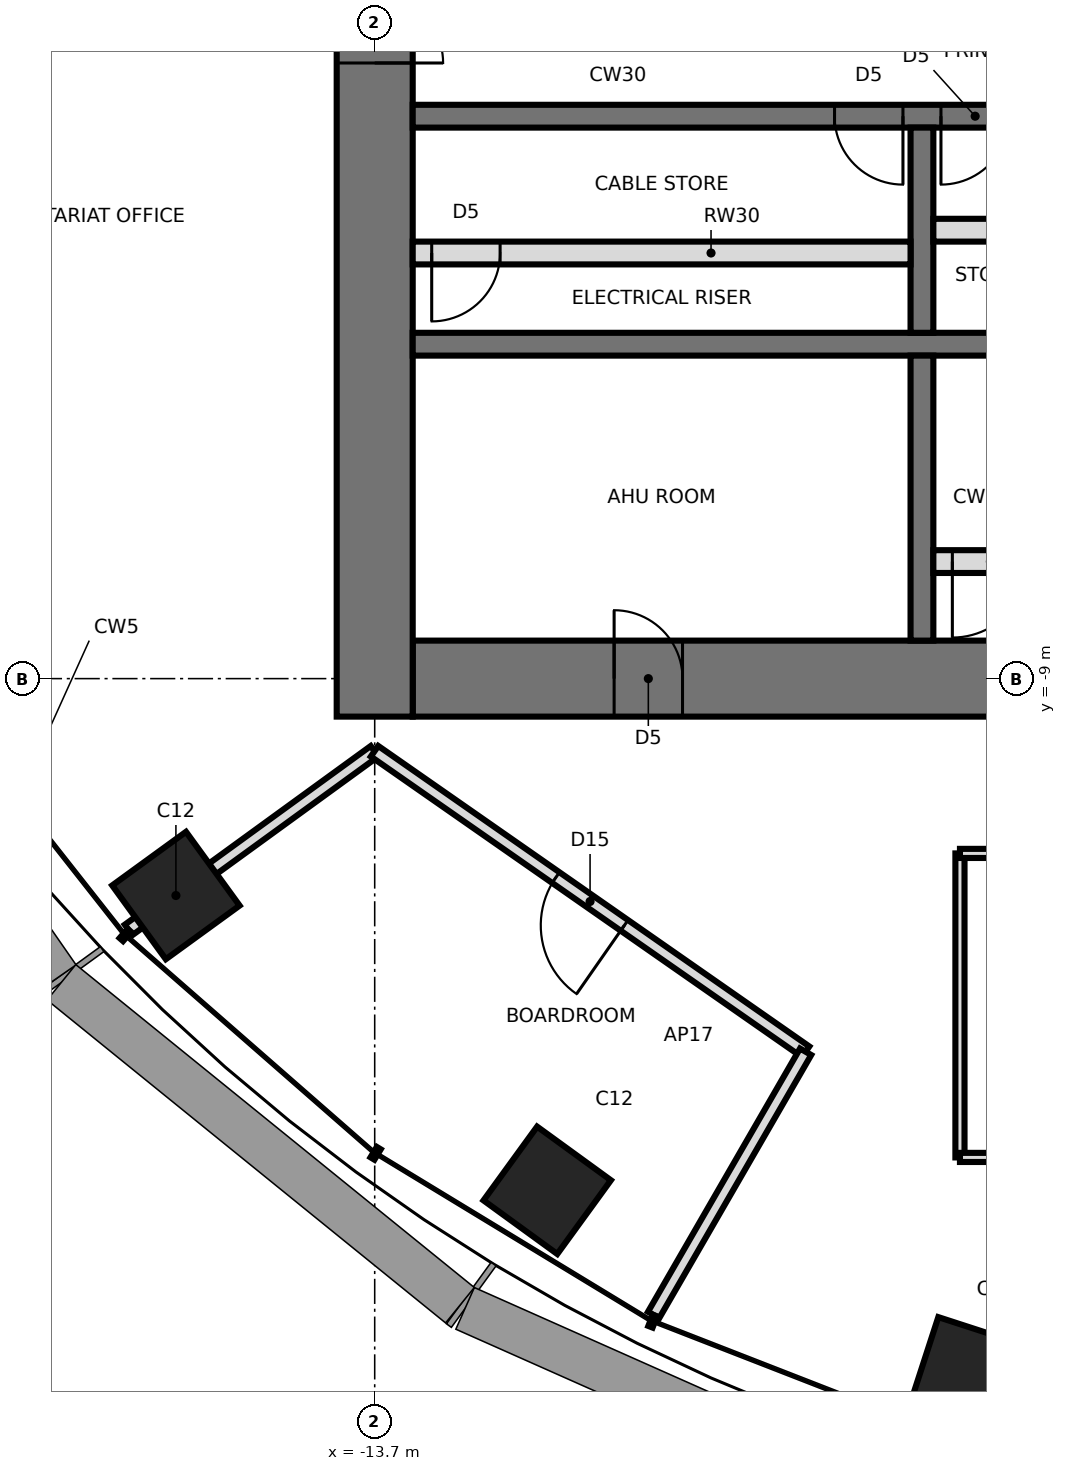
"""IFC4 building model, lengths in metres.
Left out: names, types, materials, properties, quantities, classifications, styles, units other than length and angle.
Written with IfcOpenShell. Run it as: python <this file> out.ifc"""

import sys

from ifc_helpers import new_model, si_unit, direction, frame, frame_2d, origin, origin_2d, place, context, subcontext, project, spatial, rectangle, extrude, element, fill, save


model = new_model("IFC4")
c1 = context("Model", 3, precision=1e-05, world=origin(), true_north=direction((0.0, 1.0)))
c2 = subcontext(c1, "Body", "Model", "MODEL_VIEW")
j1 = project(units=[si_unit("LENGTHUNIT", "METRE"), si_unit("PLANEANGLEUNIT", "RADIAN")], contexts=[c1])
p1 = place(None, origin())
s1 = spatial("IfcSite", under=j1, at=p1, CompositionType="ELEMENT")
p2 = place(p1, origin())
s2 = spatial("IfcBuilding", under=s1, at=p2, CompositionType="ELEMENT")
p3 = place(p2, frame((0.0, 0.0, 268.6)))
s3 = spatial("IfcBuildingStorey", under=s2, at=p3, CompositionType="ELEMENT", Elevation=268.6)
for number, where, z_axis, x_axis in (
    (1, (-16.315, -11.854, 0.0), (0.0, 0.0, 1.0), (-0.809, -0.588, 0.0)),
    (2, (-11.43, -15.733, 0.0), (0.0, 0.0, 1.0), (-0.588, -0.809, 0.0)),
    (3, (-5.9, -18.157, 0.0), (0.0, 0.0, 1.0), (-0.309, -0.951, 0.0)),
):
    element("IfcColumn", number, at=place(p3, frame(where, z_axis=z_axis, x_axis=x_axis)), inside=s3, PredefinedType="COLUMN", context=c2, shape_type="SweptSolid", body=[
        extrude(rectangle(XDim=1.2, YDim=1.2, at=origin_2d()), origin(), (0.0, 0.0, 1.0), 4.2),
    ])
p4 = place(p3, frame((-13.2, -9.0, 0.0), z_axis=(0.0, 0.0, 1.0), x_axis=(1.0, 0.0, 0.0)))
e4 = element("IfcWall", 4, at=p4, inside=s3, PredefinedType="SHEAR", context=c2, shape_type="SweptSolid", body=[
    extrude(rectangle(XDim=26.4, YDim=1.0, at=frame_2d((13.2, 0.0))), origin(), (0.0, 0.0, 1.0), 4.2),
])
p5 = place(p4, frame((2.65, 0.0, 0.0)))
e5 = element("IfcOpeningElement", 5, at=p5, cuts=e4, PredefinedType="OPENING", context=c2, shape_type="SweptSolid", body=[
    extrude(rectangle(XDim=0.9, YDim=2.1, at=frame_2d((0.45, 1.05))), frame((0.0, 0.51, 0.0), z_axis=(0.0, -1.0, 0.0), x_axis=(1.0, 0.0, 0.0)), (0.0, 0.0, 1.0), 1.02),
])
p6 = place(p4, frame((9.5, 0.0, 0.0)))
e6 = element("IfcOpeningElement", 6, at=p6, cuts=e4, PredefinedType="OPENING", context=c2, shape_type="SweptSolid", body=[
    extrude(rectangle(XDim=0.9, YDim=2.1, at=frame_2d((0.45, 1.05))), frame((0.0, 0.51, 0.0), z_axis=(0.0, -1.0, 0.0), x_axis=(1.0, 0.0, 0.0)), (0.0, 0.0, 1.0), 1.02),
])
p7 = place(p4, frame((16.0, 0.0, 0.0)))
e7 = element("IfcOpeningElement", 7, at=p7, cuts=e4, PredefinedType="OPENING", context=c2, shape_type="SweptSolid", body=[
    extrude(rectangle(XDim=0.9, YDim=2.1, at=frame_2d((0.45, 1.05))), frame((0.0, 0.51, 0.0), z_axis=(0.0, -1.0, 0.0), x_axis=(1.0, 0.0, 0.0)), (0.0, 0.0, 1.0), 1.02),
])
p8 = place(p4, frame((22.85, 0.0, 0.0)))
e8 = element("IfcOpeningElement", 8, at=p8, cuts=e4, PredefinedType="OPENING", context=c2, shape_type="SweptSolid", body=[
    extrude(rectangle(XDim=0.9, YDim=2.1, at=frame_2d((0.45, 1.05))), frame((0.0, 0.51, 0.0), z_axis=(0.0, -1.0, 0.0), x_axis=(1.0, 0.0, 0.0)), (0.0, 0.0, 1.0), 1.02),
])
p9 = place(p3, frame((-13.7, 9.5, 0.0), z_axis=(0.0, 0.0, 1.0), x_axis=(0.0, -1.0, 0.0)))
e9 = element("IfcWall", 9, at=p9, inside=s3, PredefinedType="SHEAR", context=c2, shape_type="SweptSolid", body=[
    extrude(rectangle(XDim=19.0, YDim=1.0, at=frame_2d((9.5, 0.0))), origin(), (0.0, 0.0, 1.0), 4.2),
])
p10 = place(p9, frame((8.6, 0.0, 0.0)))
e10 = element("IfcOpeningElement", 10, at=p10, cuts=e9, PredefinedType="OPENING", context=c2, shape_type="SweptSolid", body=[
    extrude(rectangle(XDim=1.8, YDim=2.4, at=frame_2d((0.9, 1.2))), frame((0.0, 0.51, 0.0), z_axis=(0.0, -1.0, 0.0), x_axis=(1.0, 0.0, 0.0)), (0.0, 0.0, 1.0), 1.02),
])
p11 = place(p3, frame((-13.2, -1.6, 0.0), z_axis=(0.0, 0.0, 1.0), x_axis=(1.0, 0.0, 0.0)))
e11 = element("IfcWall", 11, at=p11, inside=s3, PredefinedType="SHEAR", context=c2, shape_type="SweptSolid", body=[
    extrude(rectangle(XDim=26.4, YDim=0.3, at=frame_2d((13.2, 0.0))), origin(), (0.0, 0.0, 1.0), 4.2),
])
p12 = place(p11, frame((25.15, 0.0, 0.0)))
e12 = element("IfcOpeningElement", 12, at=p12, cuts=e11, PredefinedType="OPENING", context=c2, shape_type="SweptSolid", body=[
    extrude(rectangle(XDim=1.0, YDim=2.1, at=frame_2d((0.5, 1.05))), frame((0.0, 0.16, 0.0), z_axis=(0.0, -1.0, 0.0), x_axis=(1.0, 0.0, 0.0)), (0.0, 0.0, 1.0), 0.32),
])
p13 = place(p11, frame((6.95, 0.0, 0.0)))
e13 = element("IfcOpeningElement", 13, at=p13, cuts=e11, PredefinedType="OPENING", context=c2, shape_type="SweptSolid", body=[
    extrude(rectangle(XDim=0.9, YDim=2.1, at=frame_2d((0.45, 1.05))), frame((0.0, 0.16, 0.0), z_axis=(0.0, -1.0, 0.0), x_axis=(1.0, 0.0, 0.0)), (0.0, 0.0, 1.0), 0.32),
])
p14 = place(p11, frame((9.55, 0.0, 0.0)))
e14 = element("IfcOpeningElement", 14, at=p14, cuts=e11, PredefinedType="OPENING", context=c2, shape_type="SweptSolid", body=[
    extrude(rectangle(XDim=0.9, YDim=2.1, at=frame_2d((0.45, 1.05))), frame((0.0, 0.16, 0.0), z_axis=(0.0, -1.0, 0.0), x_axis=(1.0, 0.0, 0.0)), (0.0, 0.0, 1.0), 0.32),
])
p15 = place(p11, frame((12.75, 0.0, 0.0)))
e15 = element("IfcOpeningElement", 15, at=p15, cuts=e11, PredefinedType="OPENING", context=c2, shape_type="SweptSolid", body=[
    extrude(rectangle(XDim=0.9, YDim=2.1, at=frame_2d((0.45, 1.05))), frame((0.0, 0.16, 0.0), z_axis=(0.0, -1.0, 0.0), x_axis=(1.0, 0.0, 0.0)), (0.0, 0.0, 1.0), 0.32),
])
p16 = place(p11, frame((15.25, 0.0, 0.0)))
e16 = element("IfcOpeningElement", 16, at=p16, cuts=e11, PredefinedType="OPENING", context=c2, shape_type="SweptSolid", body=[
    extrude(rectangle(XDim=1.1, YDim=2.3, at=frame_2d((0.55, 1.15))), frame((0.0, 0.16, 0.0), z_axis=(0.0, -1.0, 0.0), x_axis=(1.0, 0.0, 0.0)), (0.0, 0.0, 1.0), 0.32),
])
p17 = place(p11, frame((17.85, 0.0, 0.0)))
e17 = element("IfcOpeningElement", 17, at=p17, cuts=e11, PredefinedType="OPENING", context=c2, shape_type="SweptSolid", body=[
    extrude(rectangle(XDim=1.1, YDim=2.3, at=frame_2d((0.55, 1.15))), frame((0.0, 0.16, 0.0), z_axis=(0.0, -1.0, 0.0), x_axis=(1.0, 0.0, 0.0)), (0.0, 0.0, 1.0), 0.32),
])
p18 = place(p11, frame((5.55, 0.0, 0.0)))
e18 = element("IfcOpeningElement", 18, at=p18, cuts=e11, PredefinedType="OPENING", context=c2, shape_type="SweptSolid", body=[
    extrude(rectangle(XDim=0.9, YDim=2.1, at=frame_2d((0.45, 1.05))), frame((0.0, 0.16, 0.0), z_axis=(0.0, -1.0, 0.0), x_axis=(1.0, 0.0, 0.0)), (0.0, 0.0, 1.0), 0.32),
])
p19 = place(p3, frame((-13.2, -4.6, 0.0), z_axis=(0.0, 0.0, 1.0), x_axis=(1.0, 0.0, 0.0)))
e19 = element("IfcWall", 19, at=p19, inside=s3, PredefinedType="SHEAR", context=c2, shape_type="SweptSolid", body=[
    extrude(rectangle(XDim=26.4, YDim=0.3, at=frame_2d((13.2, 0.0))), origin(), (0.0, 0.0, 1.0), 4.2),
])
p20 = place(p3, frame((-6.5, -1.75, 0.0), z_axis=(0.0, 0.0, 1.0), x_axis=(0.0, -1.0, 0.0)))
e20 = element("IfcWall", 20, at=p20, inside=s3, PredefinedType="SHEAR", context=c2, shape_type="SweptSolid", body=[
    extrude(rectangle(XDim=2.7, YDim=0.3, at=frame_2d((1.35, 0.0))), origin(), (0.0, 0.0, 1.0), 4.2),
])
p21 = place(p3, frame((-6.5, -4.75, 0.0), z_axis=(0.0, 0.0, 1.0), x_axis=(0.0, -1.0, 0.0)))
e21 = element("IfcWall", 21, at=p21, inside=s3, PredefinedType="SHEAR", context=c2, shape_type="SweptSolid", body=[
    extrude(rectangle(XDim=3.75, YDim=0.3, at=frame_2d((1.875, 0.0))), origin(), (0.0, 0.0, 1.0), 4.2),
])
p22 = place(p3, frame((-6.35, -3.1, 0.0), z_axis=(0.0, 0.0, 1.0), x_axis=(1.0, 0.0, 0.0)))
e22 = element("IfcWall", 22, at=p22, inside=s3, PredefinedType="PARTITIONING", context=c2, shape_type="SweptSolid", body=[
    extrude(rectangle(XDim=2.35, YDim=0.3, at=frame_2d((1.175, 0.0))), origin(), (0.0, 0.0, 1.0), 4.04),
])
p23 = place(p22, frame((1.25, 0.0, 0.0)))
e23 = element("IfcOpeningElement", 23, at=p23, cuts=e22, PredefinedType="OPENING", context=c2, shape_type="SweptSolid", body=[
    extrude(rectangle(XDim=1.0, YDim=2.4, at=frame_2d((0.5, 1.2))), frame((0.0, 0.16, 0.0), z_axis=(0.0, -1.0, 0.0), x_axis=(1.0, 0.0, 0.0)), (0.0, 0.0, 1.0), 0.32),
])
p24 = place(p3, frame((-6.35, -7.46, 0.0), z_axis=(0.0, 0.0, 1.0), x_axis=(1.0, 0.0, 0.0)))
e24 = element("IfcWall", 24, at=p24, inside=s3, PredefinedType="PARTITIONING", context=c2, shape_type="SweptSolid", body=[
    extrude(rectangle(XDim=6.2, YDim=0.3, at=frame_2d((3.1, 0.0))), origin(), (0.0, 0.0, 1.0), 4.04),
])
p25 = place(p24, frame((0.25, 0.0, 0.0)))
e25 = element("IfcOpeningElement", 25, at=p25, cuts=e24, PredefinedType="OPENING", context=c2, shape_type="SweptSolid", body=[
    extrude(rectangle(XDim=1.0, YDim=2.4, at=frame_2d((0.5, 1.2))), frame((0.0, 0.16, 0.0), z_axis=(0.0, -1.0, 0.0), x_axis=(1.0, 0.0, 0.0)), (0.0, 0.0, 1.0), 0.32),
])
p26 = place(p3, frame((-13.2, -3.4, 0.0), z_axis=(0.0, 0.0, 1.0), x_axis=(1.0, 0.0, 0.0)))
e26 = element("IfcWall", 26, at=p26, inside=s3, PredefinedType="SOLIDWALL", context=c2, shape_type="SweptSolid", body=[
    extrude(rectangle(XDim=6.55, YDim=0.3, at=frame_2d((3.275, 0.0))), origin(), (0.0, 0.0, 1.0), 4.04),
])
p27 = place(p26, frame((0.25, 0.0, 0.0)))
e27 = element("IfcOpeningElement", 27, at=p27, cuts=e26, PredefinedType="OPENING", context=c2, shape_type="SweptSolid", body=[
    extrude(rectangle(XDim=0.9, YDim=2.1, at=frame_2d((0.45, 1.05))), frame((0.0, 0.16, 0.0), z_axis=(0.0, -1.0, 0.0), x_axis=(1.0, 0.0, 0.0)), (0.0, 0.0, 1.0), 0.32),
])
p28 = place(p3, frame((-13.702, -9.955, 0.0), z_axis=(0.0, 0.0, 1.0), x_axis=(-0.809026317077, -0.587772420479, 0.0)))
e28 = element("IfcWall", 28, at=p28, inside=s3, PredefinedType="PARTITIONING", context=c2, shape_type="SweptSolid", body=[
    extrude(rectangle(XDim=4.0, YDim=0.17, at=frame_2d((2.0, 0.0))), origin(), (0.0, 0.0, 1.0), 3.24),
])
p29 = place(p3, frame((-8.031, -13.909, 0.0), z_axis=(0.0, 0.0, 1.0), x_axis=(-0.820320356129, 0.571904286852, 0.0)))
e29 = element("IfcWall", 29, at=p29, inside=s3, PredefinedType="PARTITIONING", context=c2, shape_type="SweptSolid", body=[
    extrude(rectangle(XDim=6.914, YDim=0.17, at=frame_2d((3.457, 0.0))), origin(), (0.0, 0.0, 1.0), 4.04),
])
p30 = place(p29, frame((2.907, 0.0, 0.0)))
e30 = element("IfcOpeningElement", 30, at=p30, cuts=e29, PredefinedType="OPENING", context=c2, shape_type="SweptSolid", body=[
    extrude(rectangle(XDim=1.1, YDim=2.4, at=frame_2d((0.55, 1.2))), frame((0.0, 0.095, 0.0), z_axis=(0.0, -1.0, 0.0), x_axis=(1.0, 0.0, 0.0)), (0.0, 0.0, 1.0), 0.19),
])
p31 = place(p3, frame((-10.031, -17.374, 0.0), z_axis=(0.0, 0.0, 1.0), x_axis=(0.49999894854, 0.866026010844, 0.0)))
e31 = element("IfcWall", 31, at=p31, inside=s3, PredefinedType="PARTITIONING", context=c2, shape_type="SweptSolid", body=[
    extrude(rectangle(XDim=4.0, YDim=0.17, at=frame_2d((2.0, 0.0))), origin(), (0.0, 0.0, 1.0), 4.04),
])
p32 = place(p3, frame((-6.0, -15.3, 0.0), z_axis=(0.0, 0.0, 1.0), x_axis=(0.0, 1.0, 0.0)))
e32 = element("IfcWall", 32, at=p32, inside=s3, PredefinedType="PARTITIONING", context=c2, shape_type="SweptSolid", body=[
    extrude(rectangle(XDim=4.0, YDim=0.12, at=frame_2d((2.0, 0.0))), origin(), (0.0, 0.0, 1.0), 4.04),
])
p33 = place(p3, frame((-6.0, -11.3, 0.0), z_axis=(0.0, 0.0, 1.0), x_axis=(1.0, 0.0, 0.0)))
e33 = element("IfcWall", 33, at=p33, inside=s3, PredefinedType="PARTITIONING", context=c2, shape_type="SweptSolid", body=[
    extrude(rectangle(XDim=10.0, YDim=0.12, at=frame_2d((5.0, 0.0))), origin(), (0.0, 0.0, 1.0), 4.04),
])
p34 = place(p33, frame((2.5, 0.0, 0.0)))
e34 = element("IfcOpeningElement", 34, at=p34, cuts=e33, PredefinedType="OPENING", context=c2, shape_type="SweptSolid", body=[
    extrude(rectangle(XDim=1.0, YDim=2.4, at=frame_2d((0.5, 1.2))), frame((0.0, 0.07, 0.0), z_axis=(0.0, -1.0, 0.0), x_axis=(1.0, 0.0, 0.0)), (0.0, 0.0, 1.0), 0.14),
])
p35 = place(p33, frame((7.5, 0.0, 0.0)))
e35 = element("IfcOpeningElement", 35, at=p35, cuts=e33, PredefinedType="OPENING", context=c2, shape_type="SweptSolid", body=[
    extrude(rectangle(XDim=1.0, YDim=2.4, at=frame_2d((0.5, 1.2))), frame((0.0, 0.07, 0.0), z_axis=(0.0, -1.0, 0.0), x_axis=(1.0, 0.0, 0.0)), (0.0, 0.0, 1.0), 0.14),
])
p36 = place(p3, frame((4.0, -15.3, 0.0), z_axis=(0.0, 0.0, 1.0), x_axis=(-1.0, 0.0, 0.0)))
e36 = element("IfcWall", 36, at=p36, inside=s3, PredefinedType="PARTITIONING", context=c2, shape_type="SweptSolid", body=[
    extrude(rectangle(XDim=10.0, YDim=0.12, at=frame_2d((5.0, 0.0))), origin(), (0.0, 0.0, 1.0), 3.637),
])
p37 = place(p10, origin())
e37 = element("IfcDoor", 37, at=p37, inside=s3, OperationType="DOUBLE_DOOR_SINGLE_SWING", PredefinedType="DOOR", context=c2, shape_type="SweptSolid", body=[
    extrude(rectangle(XDim=1.72, YDim=2.36, at=frame_2d((0.9, 1.18))), frame((0.0, 0.025, 0.0), z_axis=(0.0, -1.0, 0.0), x_axis=(1.0, 0.0, 0.0)), (0.0, 0.0, 1.0), 0.05),
    extrude(rectangle(XDim=0.04, YDim=2.4, at=frame_2d((0.02, 1.2))), frame((0.0, 0.25, 0.0), z_axis=(0.0, -1.0, 0.0), x_axis=(1.0, 0.0, 0.0)), (0.0, 0.0, 1.0), 0.5),
    extrude(rectangle(XDim=0.04, YDim=2.4, at=frame_2d((1.78, 1.2))), frame((0.0, 0.25, 0.0), z_axis=(0.0, -1.0, 0.0), x_axis=(1.0, 0.0, 0.0)), (0.0, 0.0, 1.0), 0.5),
    extrude(rectangle(XDim=1.72, YDim=0.04, at=frame_2d((0.9, 2.38))), frame((0.0, 0.25, 0.0), z_axis=(0.0, -1.0, 0.0), x_axis=(1.0, 0.0, 0.0)), (0.0, 0.0, 1.0), 0.5),
])
fill(e10, e37)
p38 = place(p13, frame((0.9, 0.0, 0.0), z_axis=(0.0, 0.0, 1.0), x_axis=(-1.0, 0.0, 0.0)))
e38 = element("IfcDoor", 38, at=p38, inside=s3, OperationType="SINGLE_SWING_RIGHT", PredefinedType="DOOR", context=c2, shape_type="SweptSolid", body=[
    extrude(rectangle(XDim=0.9, YDim=2.1, at=frame_2d((0.45, 1.05))), frame((0.0, 0.025, 0.0), z_axis=(0.0, -1.0, 0.0), x_axis=(1.0, 0.0, 0.0)), (0.0, 0.0, 1.0), 0.05),
])
fill(e13, e38)
p39 = place(p18, frame((0.9, 0.0, 0.0), z_axis=(0.0, 0.0, 1.0), x_axis=(-1.0, 0.0, 0.0)))
e39 = element("IfcDoor", 39, at=p39, inside=s3, OperationType="SINGLE_SWING_LEFT", PredefinedType="DOOR", context=c2, shape_type="SweptSolid", body=[
    extrude(rectangle(XDim=0.9, YDim=2.1, at=frame_2d((0.45, 1.05))), frame((0.0, 0.025, 0.0), z_axis=(0.0, -1.0, 0.0), x_axis=(1.0, 0.0, 0.0)), (0.0, 0.0, 1.0), 0.05),
])
fill(e18, e39)
p40 = place(p5, origin())
e40 = element("IfcDoor", 40, at=p40, inside=s3, OperationType="SINGLE_SWING_LEFT", PredefinedType="DOOR", context=c2, shape_type="SweptSolid", body=[
    extrude(rectangle(XDim=0.82, YDim=2.06, at=frame_2d((0.45, 1.03))), frame((0.0, 0.025, 0.0), z_axis=(0.0, -1.0, 0.0), x_axis=(1.0, 0.0, 0.0)), (0.0, 0.0, 1.0), 0.05),
    extrude(rectangle(XDim=0.04, YDim=2.1, at=frame_2d((0.02, 1.05))), frame((0.0, 0.25, 0.0), z_axis=(0.0, -1.0, 0.0), x_axis=(1.0, 0.0, 0.0)), (0.0, 0.0, 1.0), 0.5),
    extrude(rectangle(XDim=0.04, YDim=2.1, at=frame_2d((0.88, 1.05))), frame((0.0, 0.25, 0.0), z_axis=(0.0, -1.0, 0.0), x_axis=(1.0, 0.0, 0.0)), (0.0, 0.0, 1.0), 0.5),
    extrude(rectangle(XDim=0.82, YDim=0.04, at=frame_2d((0.45, 2.08))), frame((0.0, 0.25, 0.0), z_axis=(0.0, -1.0, 0.0), x_axis=(1.0, 0.0, 0.0)), (0.0, 0.0, 1.0), 0.5),
])
fill(e5, e40)
p41 = place(p25, frame((1.0, 0.0, 0.0), z_axis=(0.0, 0.0, 1.0), x_axis=(-1.0, 0.0, 0.0)))
e41 = element("IfcDoor", 41, at=p41, inside=s3, OperationType="SINGLE_SWING_RIGHT", PredefinedType="DOOR", context=c2, shape_type="SweptSolid", body=[
    extrude(rectangle(XDim=1.0, YDim=2.4, at=frame_2d((0.5, 1.2))), frame((0.0, 0.025, 0.0), z_axis=(0.0, -1.0, 0.0), x_axis=(1.0, 0.0, 0.0)), (0.0, 0.0, 1.0), 0.05),
])
fill(e25, e41)
p42 = place(p27, frame((0.9, 0.0, 0.0), z_axis=(0.0, 0.0, 1.0), x_axis=(-1.0, 0.0, 0.0)))
e42 = element("IfcDoor", 42, at=p42, inside=s3, OperationType="SINGLE_SWING_RIGHT", PredefinedType="DOOR", context=c2, shape_type="SweptSolid", body=[
    extrude(rectangle(XDim=0.9, YDim=2.1, at=frame_2d((0.45, 1.05))), frame((0.0, 0.025, 0.0), z_axis=(0.0, -1.0, 0.0), x_axis=(1.0, 0.0, 0.0)), (0.0, 0.0, 1.0), 0.05),
])
fill(e27, e42)
p43 = place(p30, origin())
e43 = element("IfcDoor", 43, at=p43, inside=s3, OperationType="SINGLE_SWING_LEFT", PredefinedType="DOOR", context=c2, shape_type="SweptSolid", body=[
    extrude(rectangle(XDim=1.1, YDim=2.4, at=frame_2d((0.55, 1.2))), frame((0.0, 0.025, 0.0), z_axis=(0.0, -1.0, 0.0), x_axis=(1.0, 0.0, 0.0)), (0.0, 0.0, 1.0), 0.05),
])
fill(e30, e43)
save(model, sys.argv[1])
